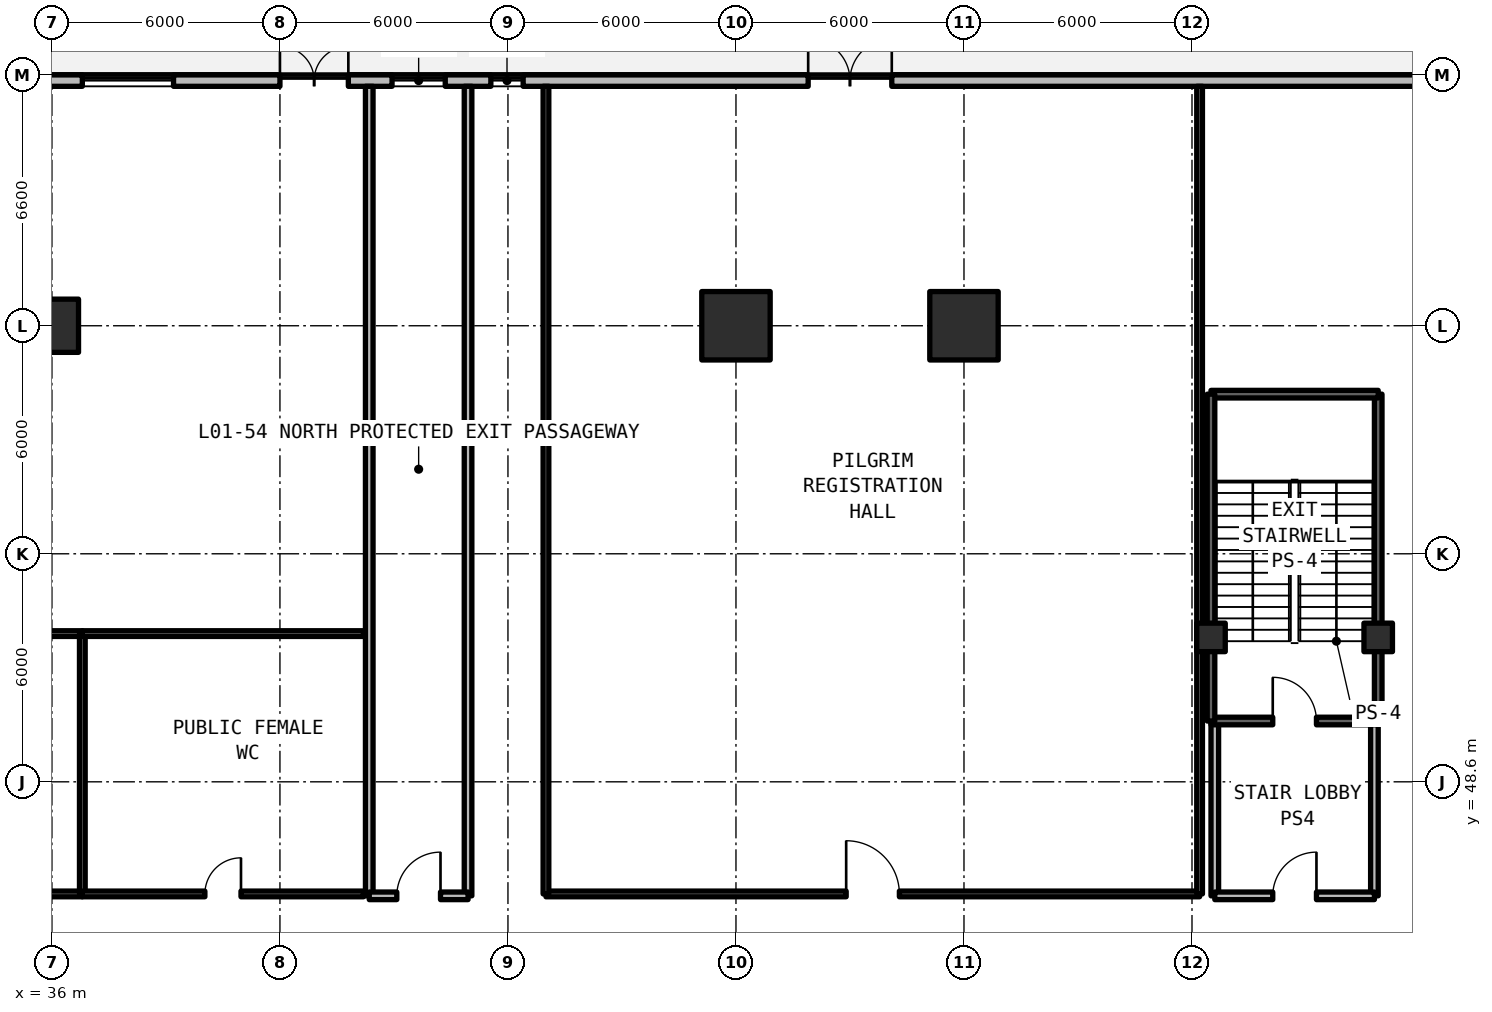
"""IFC4 building model, lengths in metres.
Left out: names, types, materials, properties, quantities, classifications, styles, units other than length and angle.
Written with IfcOpenShell. Run it as: python <this file> out.ifc"""

import sys

from ifc_helpers import new_model, si_unit, direction, frame, frame_2d, origin, origin_2d, place, context, subcontext, project, spatial, rectangle, circle, extrude, element, fill, save


model = new_model("IFC4")
c1 = context("Model", 3, precision=1e-05, world=origin(), true_north=direction((0.0, 1.0)))
c2 = subcontext(c1, "Body", "Model", "MODEL_VIEW")
j1 = project(units=[si_unit("LENGTHUNIT", "METRE"), si_unit("PLANEANGLEUNIT", "RADIAN")], contexts=[c1])
p1 = place(None, origin())
s1 = spatial("IfcSite", under=j1, at=p1, CompositionType="ELEMENT")
p2 = place(p1, origin())
s2 = spatial("IfcBuilding", under=s1, at=p2, CompositionType="ELEMENT")
p3 = place(p2, origin())
s3 = spatial("IfcBuildingStorey", under=s2, at=p3, CompositionType="ELEMENT", Elevation=0.0)
p4 = place(p3, frame((36.0, 60.6, 0.0), z_axis=(0.0, 0.0, 1.0), x_axis=(1.0, 0.0, 0.0)))
e1 = element("IfcColumn", 1, at=p4, inside=s3, PredefinedType="COLUMN", context=c2, shape_type="SweptSolid", body=[
    extrude(circle(Radius=0.7, at=origin_2d()), origin(), (0.0, 0.0, 1.0), 4.95),
])
for number, where, z_axis, x_axis in (
    (2, (54.0, 60.6, 0.0), (0.0, 0.0, 1.0), (1.0, 0.0, 0.0)),
    (3, (60.0, 60.6, 0.0), (0.0, 0.0, 1.0), (1.0, 0.0, 0.0)),
):
    element("IfcColumn", number, at=place(p3, frame(where, z_axis=z_axis, x_axis=x_axis)), inside=s3, PredefinedType="COLUMN", context=c2, shape_type="SweptSolid", body=[
        extrude(rectangle(XDim=1.8, YDim=1.8, at=origin_2d()), origin(), (0.0, 0.0, 1.0), 4.95),
    ])
for number, where, z_axis, x_axis in (
    (4, (66.5, 52.4, 0.0), (0.0, 0.0, 1.0), (1.0, 0.0, 0.0)),
    (5, (70.9, 52.4, 0.0), (0.0, 0.0, 1.0), (1.0, 0.0, 0.0)),
):
    element("IfcColumn", number, at=place(p3, frame(where, z_axis=z_axis, x_axis=x_axis)), inside=s3, PredefinedType="COLUMN", context=c2, shape_type="SweptSolid", body=[
        extrude(rectangle(XDim=0.75, YDim=0.75, at=origin_2d()), origin(), (0.0, 0.0, 1.0), 4.95),
    ])
p5 = place(p3, frame((113.85, 67.05, 0.0), z_axis=(0.0, 0.0, 1.0), x_axis=(-1.0, 0.0, 0.0)))
e6 = element("IfcWall", 6, at=p5, inside=s3, PredefinedType="SOLIDWALL", context=c2, shape_type="SweptSolid", body=[
    extrude(rectangle(XDim=113.7, YDim=0.3, at=frame_2d((56.85, 0.0))), origin(), (0.0, 0.0, 1.0), 4.67),
])
p6 = place(p5, frame((6.25, 0.0, 0.0)))
e7 = element("IfcOpeningElement", 7, at=p6, cuts=e6, PredefinedType="OPENING", context=c2, shape_type="SweptSolid", body=[
    extrude(rectangle(XDim=1.2, YDim=2.2, at=frame_2d((0.6, 1.1))), frame((0.0, 0.16, 0.0), z_axis=(0.0, -1.0, 0.0), x_axis=(1.0, 0.0, 0.0)), (0.0, 0.0, 1.0), 0.32),
])
p7 = place(p5, frame((15.95, 0.0, 0.0)))
e8 = element("IfcOpeningElement", 8, at=p7, cuts=e6, PredefinedType="OPENING", context=c2, shape_type="SweptSolid", body=[
    extrude(rectangle(XDim=1.8, YDim=2.25, at=frame_2d((0.9, 1.125))), frame((0.0, 0.16, 0.0), z_axis=(0.0, -1.0, 0.0), x_axis=(1.0, 0.0, 0.0)), (0.0, 0.0, 1.0), 0.32),
])
p8 = place(p5, frame((55.75, 0.0, 0.0)))
e9 = element("IfcOpeningElement", 9, at=p8, cuts=e6, PredefinedType="OPENING", context=c2, shape_type="SweptSolid", body=[
    extrude(rectangle(XDim=2.2, YDim=2.6, at=frame_2d((1.1, 1.3))), frame((0.0, 0.16, 0.0), z_axis=(0.0, -1.0, 0.0), x_axis=(1.0, 0.0, 0.0)), (0.0, 0.0, 1.0), 0.32),
])
p9 = place(p5, frame((70.05, 0.0, 0.0)))
e10 = element("IfcOpeningElement", 10, at=p9, cuts=e6, PredefinedType="OPENING", context=c2, shape_type="SweptSolid", body=[
    extrude(rectangle(XDim=1.8, YDim=2.25, at=frame_2d((0.9, 1.125))), frame((0.0, 0.16, 0.0), z_axis=(0.0, -1.0, 0.0), x_axis=(1.0, 0.0, 0.0)), (0.0, 0.0, 1.0), 0.32),
])
p10 = place(p5, frame((106.75, 0.0, 0.0)))
e11 = element("IfcOpeningElement", 11, at=p10, cuts=e6, PredefinedType="OPENING", context=c2, shape_type="SweptSolid", body=[
    extrude(rectangle(XDim=1.2, YDim=2.2, at=frame_2d((0.6, 1.1))), frame((0.0, 0.16, 0.0), z_axis=(0.0, -1.0, 0.0), x_axis=(1.0, 0.0, 0.0)), (0.0, 0.0, 1.0), 0.32),
])
p11 = place(p5, frame((67.5, 0.0, 0.78)))
e12 = element("IfcOpeningElement", 12, at=p11, cuts=e6, PredefinedType="OPENING", context=c2, shape_type="SweptSolid", body=[
    extrude(rectangle(XDim=1.4, YDim=1.65, at=frame_2d((0.7, 0.825))), frame((0.0, 0.16, 0.0), z_axis=(0.0, -1.0, 0.0), x_axis=(1.0, 0.0, 0.0)), (0.0, 0.0, 1.0), 0.32),
])
p12 = place(p5, frame((65.45, 0.0, 0.78)))
e13 = element("IfcOpeningElement", 13, at=p12, cuts=e6, PredefinedType="OPENING", context=c2, shape_type="SweptSolid", body=[
    extrude(rectangle(XDim=0.85, YDim=1.65, at=frame_2d((0.425, 0.825))), frame((0.0, 0.16, 0.0), z_axis=(0.0, -1.0, 0.0), x_axis=(1.0, 0.0, 0.0)), (0.0, 0.0, 1.0), 0.32),
])
p13 = place(p5, frame((27.15, 0.0, 0.78)))
e14 = element("IfcOpeningElement", 14, at=p13, cuts=e6, PredefinedType="OPENING", context=c2, shape_type="SweptSolid", body=[
    extrude(rectangle(XDim=2.4, YDim=1.66, at=frame_2d((1.2, 0.83))), frame((0.0, 0.16, 0.0), z_axis=(0.0, -1.0, 0.0), x_axis=(1.0, 0.0, 0.0)), (0.0, 0.0, 1.0), 0.32),
])
p14 = place(p5, frame((36.65, 0.0, 0.78)))
e15 = element("IfcOpeningElement", 15, at=p14, cuts=e6, PredefinedType="OPENING", context=c2, shape_type="SweptSolid", body=[
    extrude(rectangle(XDim=2.4, YDim=1.66, at=frame_2d((1.2, 0.83))), frame((0.0, 0.16, 0.0), z_axis=(0.0, -1.0, 0.0), x_axis=(1.0, 0.0, 0.0)), (0.0, 0.0, 1.0), 0.32),
])
p15 = place(p5, frame((74.65, 0.0, 0.78)))
e16 = element("IfcOpeningElement", 16, at=p15, cuts=e6, PredefinedType="OPENING", context=c2, shape_type="SweptSolid", body=[
    extrude(rectangle(XDim=2.4, YDim=1.66, at=frame_2d((1.2, 0.83))), frame((0.0, 0.16, 0.0), z_axis=(0.0, -1.0, 0.0), x_axis=(1.0, 0.0, 0.0)), (0.0, 0.0, 1.0), 0.32),
])
p16 = place(p5, frame((84.15, 0.0, 0.78)))
e17 = element("IfcOpeningElement", 17, at=p16, cuts=e6, PredefinedType="OPENING", context=c2, shape_type="SweptSolid", body=[
    extrude(rectangle(XDim=2.4, YDim=1.66, at=frame_2d((1.2, 0.83))), frame((0.0, 0.16, 0.0), z_axis=(0.0, -1.0, 0.0), x_axis=(1.0, 0.0, 0.0)), (0.0, 0.0, 1.0), 0.32),
])
p17 = place(p5, frame((93.65, 0.0, 0.78)))
e18 = element("IfcOpeningElement", 18, at=p17, cuts=e6, PredefinedType="OPENING", context=c2, shape_type="SweptSolid", body=[
    extrude(rectangle(XDim=2.4, YDim=1.66, at=frame_2d((1.2, 0.83))), frame((0.0, 0.16, 0.0), z_axis=(0.0, -1.0, 0.0), x_axis=(1.0, 0.0, 0.0)), (0.0, 0.0, 1.0), 0.32),
])
p18 = place(p5, frame((103.15, 0.0, 0.78)))
e19 = element("IfcOpeningElement", 19, at=p18, cuts=e6, PredefinedType="OPENING", context=c2, shape_type="SweptSolid", body=[
    extrude(rectangle(XDim=2.4, YDim=1.66, at=frame_2d((1.2, 0.83))), frame((0.0, 0.16, 0.0), z_axis=(0.0, -1.0, 0.0), x_axis=(1.0, 0.0, 0.0)), (0.0, 0.0, 1.0), 0.32),
])
for number, where, z_axis, x_axis in (
    (20, (66.6, 45.6, 0.0), (0.0, 0.0, 1.0), (0.0, 1.0, 0.0)),
    (21, (70.8, 45.6, 0.0), (0.0, 0.0, 1.0), (0.0, 1.0, 0.0)),
):
    element("IfcWall", number, at=place(p3, frame(where, z_axis=z_axis, x_axis=x_axis)), inside=s3, PredefinedType="SOLIDWALL", context=c2, shape_type="SweptSolid", body=[
        extrude(rectangle(XDim=4.6, YDim=0.2, at=frame_2d((2.3, 0.0))), origin(), (0.0, 0.0, 1.0), 3.89),
    ])
p19 = place(p3, frame((66.6, 45.6, 0.0), z_axis=(0.0, 0.0, 1.0), x_axis=(1.0, 0.0, 0.0)))
e22 = element("IfcWall", 22, at=p19, inside=s3, PredefinedType="SOLIDWALL", context=c2, shape_type="SweptSolid", body=[
    extrude(rectangle(XDim=4.2, YDim=0.2, at=frame_2d((2.1, 0.0))), origin(), (0.0, 0.0, 1.0), 3.89),
])
p20 = place(p19, frame((1.525, 0.0, 0.0)))
e23 = element("IfcOpeningElement", 23, at=p20, cuts=e22, PredefinedType="OPENING", context=c2, shape_type="SweptSolid", body=[
    extrude(rectangle(XDim=1.15, YDim=2.15, at=frame_2d((0.575, 1.075))), frame((0.0, 0.11, 0.0), z_axis=(0.0, -1.0, 0.0), x_axis=(1.0, 0.0, 0.0)), (0.0, 0.0, 1.0), 0.22),
])
for number, where, z_axis, x_axis in (
    (24, (44.35, 45.6, 0.0), (0.0, 0.0, 1.0), (0.0, 1.0, 0.0)),
    (25, (46.95, 45.6, 0.0), (0.0, 0.0, 1.0), (0.0, 1.0, 0.0)),
):
    element("IfcWall", number, at=place(p3, frame(where, z_axis=z_axis, x_axis=x_axis)), inside=s3, PredefinedType="SOLIDWALL", context=c2, shape_type="SweptSolid", body=[
        extrude(rectangle(XDim=21.3, YDim=0.2, at=frame_2d((10.65, 0.0))), origin(), (0.0, 0.0, 1.0), 3.89),
    ])
p21 = place(p3, frame((44.35, 45.6, 0.0), z_axis=(0.0, 0.0, 1.0), x_axis=(1.0, 0.0, 0.0)))
e26 = element("IfcWall", 26, at=p21, inside=s3, PredefinedType="SOLIDWALL", context=c2, shape_type="SweptSolid", body=[
    extrude(rectangle(XDim=2.6, YDim=0.2, at=frame_2d((1.3, 0.0))), origin(), (0.0, 0.0, 1.0), 3.89),
])
p22 = place(p21, frame((0.725, 0.0, 0.0)))
e27 = element("IfcOpeningElement", 27, at=p22, cuts=e26, PredefinedType="OPENING", context=c2, shape_type="SweptSolid", body=[
    extrude(rectangle(XDim=1.15, YDim=2.15, at=frame_2d((0.575, 1.075))), frame((0.0, 0.11, 0.0), z_axis=(0.0, -1.0, 0.0), x_axis=(1.0, 0.0, 0.0)), (0.0, 0.0, 1.0), 0.22),
])
p23 = place(p3, frame((49.0, 45.65, 0.0), z_axis=(0.0, 0.0, 1.0), x_axis=(1.0, 0.0, 0.0)))
e28 = element("IfcWall", 28, at=p23, inside=s3, PredefinedType="SOLIDWALL", context=c2, shape_type="SweptSolid", body=[
    extrude(rectangle(XDim=17.2, YDim=0.15, at=frame_2d((8.6, 0.0))), origin(), (0.0, 0.0, 1.0), 3.89),
])
p24 = place(p23, frame((7.9, 0.0, 0.0)))
e29 = element("IfcOpeningElement", 29, at=p24, cuts=e28, PredefinedType="OPENING", context=c2, shape_type="SweptSolid", body=[
    extrude(rectangle(XDim=1.4, YDim=2.15, at=frame_2d((0.7, 1.075))), frame((0.0, 0.085, 0.0), z_axis=(0.0, -1.0, 0.0), x_axis=(1.0, 0.0, 0.0)), (0.0, 0.0, 1.0), 0.17),
])
for number, where, z_axis, x_axis in (
    (30, (49.0, 45.65, 0.0), (0.0, 0.0, 1.0), (0.0, 1.0, 0.0)),
    (31, (66.2, 45.65, 0.0), (0.0, 0.0, 1.0), (0.0, 1.0, 0.0)),
):
    element("IfcWall", number, at=place(p3, frame(where, z_axis=z_axis, x_axis=x_axis)), inside=s3, PredefinedType="SOLIDWALL", context=c2, shape_type="SweptSolid", body=[
        extrude(rectangle(XDim=21.25, YDim=0.15, at=frame_2d((10.625, 0.0))), origin(), (0.0, 0.0, 1.0), 3.89),
    ])
p25 = place(p3, frame((30.15, 45.65, 0.0), z_axis=(0.0, 0.0, 1.0), x_axis=(1.0, 0.0, 0.0)))
e32 = element("IfcWall", 32, at=p25, inside=s3, PredefinedType="SOLIDWALL", context=c2, shape_type="SweptSolid", body=[
    extrude(rectangle(XDim=6.65, YDim=0.15, at=frame_2d((3.325, 0.0))), origin(), (0.0, 0.0, 1.0), 3.89),
])
p26 = place(p25, frame((2.85, 0.0, 0.0)))
e33 = element("IfcOpeningElement", 33, at=p26, cuts=e32, PredefinedType="OPENING", context=c2, shape_type="SweptSolid", body=[
    extrude(rectangle(XDim=0.95, YDim=2.15, at=frame_2d((0.475, 1.075))), frame((0.0, 0.085, 0.0), z_axis=(0.0, -1.0, 0.0), x_axis=(1.0, 0.0, 0.0)), (0.0, 0.0, 1.0), 0.17),
])
p27 = place(p3, frame((30.15, 52.5, 0.0), z_axis=(0.0, 0.0, 1.0), x_axis=(1.0, 0.0, 0.0)))
e34 = element("IfcWall", 34, at=p27, inside=s3, PredefinedType="SOLIDWALL", context=c2, shape_type="SweptSolid", body=[
    extrude(rectangle(XDim=6.65, YDim=0.15, at=frame_2d((3.325, 0.0))), origin(), (0.0, 0.0, 1.0), 3.89),
])
p28 = place(p3, frame((36.8, 45.65, 0.0), z_axis=(0.0, 0.0, 1.0), x_axis=(0.0, 1.0, 0.0)))
e35 = element("IfcWall", 35, at=p28, inside=s3, PredefinedType="SOLIDWALL", context=c2, shape_type="SweptSolid", body=[
    extrude(rectangle(XDim=6.85, YDim=0.15, at=frame_2d((3.425, 0.0))), origin(), (0.0, 0.0, 1.0), 3.89),
])
p29 = place(p3, frame((36.8, 45.65, 0.0), z_axis=(0.0, 0.0, 1.0), x_axis=(1.0, 0.0, 0.0)))
e36 = element("IfcWall", 36, at=p29, inside=s3, PredefinedType="SOLIDWALL", context=c2, shape_type="SweptSolid", body=[
    extrude(rectangle(XDim=7.4, YDim=0.15, at=frame_2d((3.7, 0.0))), origin(), (0.0, 0.0, 1.0), 3.89),
])
p30 = place(p29, frame((3.225, 0.0, 0.0)))
e37 = element("IfcOpeningElement", 37, at=p30, cuts=e36, PredefinedType="OPENING", context=c2, shape_type="SweptSolid", body=[
    extrude(rectangle(XDim=0.95, YDim=2.15, at=frame_2d((0.475, 1.075))), frame((0.0, 0.085, 0.0), z_axis=(0.0, -1.0, 0.0), x_axis=(1.0, 0.0, 0.0)), (0.0, 0.0, 1.0), 0.17),
])
p31 = place(p3, frame((36.8, 52.5, 0.0), z_axis=(0.0, 0.0, 1.0), x_axis=(1.0, 0.0, 0.0)))
e38 = element("IfcWall", 38, at=p31, inside=s3, PredefinedType="SOLIDWALL", context=c2, shape_type="SweptSolid", body=[
    extrude(rectangle(XDim=7.4, YDim=0.15, at=frame_2d((3.7, 0.0))), origin(), (0.0, 0.0, 1.0), 3.89),
])
p32 = place(p3, frame((66.5, 50.2, 0.0), z_axis=(0.0, 0.0, 1.0), x_axis=(1.0, 0.0, 0.0)))
e39 = element("IfcWall", 39, at=p32, inside=s3, PredefinedType="SOLIDWALL", context=c2, shape_type="SweptSolid", body=[
    extrude(rectangle(XDim=4.4, YDim=0.2, at=frame_2d((2.2, 0.0))), origin(), (0.0, 0.0, 1.0), 4.95),
])
p33 = place(p32, frame((1.625, 0.0, 0.0)))
e40 = element("IfcOpeningElement", 40, at=p33, cuts=e39, PredefinedType="OPENING", context=c2, shape_type="SweptSolid", body=[
    extrude(rectangle(XDim=1.15, YDim=2.15, at=frame_2d((0.575, 1.075))), frame((0.0, 0.11, 0.0), z_axis=(0.0, -1.0, 0.0), x_axis=(1.0, 0.0, 0.0)), (0.0, 0.0, 1.0), 0.22),
])
p34 = place(p3, frame((70.9, 50.2, 0.0), z_axis=(0.0, 0.0, 1.0), x_axis=(0.0, 1.0, 0.0)))
e41 = element("IfcWall", 41, at=p34, inside=s3, PredefinedType="SOLIDWALL", context=c2, shape_type="SweptSolid", body=[
    extrude(rectangle(XDim=8.6, YDim=0.2, at=frame_2d((4.3, 0.0))), origin(), (0.0, 0.0, 1.0), 4.95),
])
p35 = place(p3, frame((70.9, 58.8, 0.0), z_axis=(0.0, 0.0, 1.0), x_axis=(-1.0, 0.0, 0.0)))
e42 = element("IfcWall", 42, at=p35, inside=s3, PredefinedType="SOLIDWALL", context=c2, shape_type="SweptSolid", body=[
    extrude(rectangle(XDim=4.4, YDim=0.2, at=frame_2d((2.2, 0.0))), origin(), (0.0, 0.0, 1.0), 4.95),
])
p36 = place(p3, frame((66.5, 58.8, 0.0), z_axis=(0.0, 0.0, 1.0), x_axis=(0.0, -1.0, 0.0)))
e43 = element("IfcWall", 43, at=p36, inside=s3, PredefinedType="SOLIDWALL", context=c2, shape_type="SweptSolid", body=[
    extrude(rectangle(XDim=8.6, YDim=0.2, at=frame_2d((4.3, 0.0))), origin(), (0.0, 0.0, 1.0), 4.95),
])
p37 = place(p8, frame((2.2, 0.0, 0.0), z_axis=(0.0, 0.0, 1.0), x_axis=(-1.0, 0.0, 0.0)))
e44 = element("IfcDoor", 44, at=p37, inside=s3, OperationType="SINGLE_SWING_LEFT", PredefinedType="DOOR", context=c2, shape_type="SweptSolid", body=[
    extrude(rectangle(XDim=2.2, YDim=2.6, at=frame_2d((1.1, 1.3))), frame((0.0, 0.025, 0.0), z_axis=(0.0, -1.0, 0.0), x_axis=(1.0, 0.0, 0.0)), (0.0, 0.0, 1.0), 0.05),
])
fill(e9, e44)
p38 = place(p9, frame((1.8, 0.0, 0.0), z_axis=(0.0, 0.0, 1.0), x_axis=(-1.0, 0.0, 0.0)))
e45 = element("IfcDoor", 45, at=p38, inside=s3, OperationType="SINGLE_SWING_RIGHT", PredefinedType="DOOR", context=c2, shape_type="SweptSolid", body=[
    extrude(rectangle(XDim=1.8, YDim=2.25, at=frame_2d((0.9, 1.125))), frame((0.0, 0.025, 0.0), z_axis=(0.0, -1.0, 0.0), x_axis=(1.0, 0.0, 0.0)), (0.0, 0.0, 1.0), 0.05),
])
fill(e10, e45)
p39 = place(p11, origin())
e46 = element("IfcWindow", 46, at=p39, inside=s3, PartitioningType="SINGLE_PANEL", PredefinedType="WINDOW", context=c2, shape_type="SweptSolid", body=[
    extrude(rectangle(XDim=1.4, YDim=1.65, at=frame_2d((0.7, 0.825))), frame((0.0, 0.03, 0.0), z_axis=(0.0, -1.0, 0.0), x_axis=(1.0, 0.0, 0.0)), (0.0, 0.0, 1.0), 0.06),
])
fill(e12, e46)
p40 = place(p12, origin())
e47 = element("IfcWindow", 47, at=p40, inside=s3, PartitioningType="SINGLE_PANEL", PredefinedType="WINDOW", context=c2, shape_type="SweptSolid", body=[
    extrude(rectangle(XDim=0.85, YDim=1.65, at=frame_2d((0.425, 0.825))), frame((0.0, 0.03, 0.0), z_axis=(0.0, -1.0, 0.0), x_axis=(1.0, 0.0, 0.0)), (0.0, 0.0, 1.0), 0.06),
])
fill(e13, e47)
p41 = place(p15, origin())
e48 = element("IfcWindow", 48, at=p41, inside=s3, PartitioningType="SINGLE_PANEL", PredefinedType="WINDOW", context=c2, shape_type="SweptSolid", body=[
    extrude(rectangle(XDim=2.4, YDim=1.66, at=frame_2d((1.2, 0.83))), frame((0.0, 0.03, 0.0), z_axis=(0.0, -1.0, 0.0), x_axis=(1.0, 0.0, 0.0)), (0.0, 0.0, 1.0), 0.06),
])
fill(e16, e48)
p42 = place(p20, frame((1.15, 0.0, 0.0), z_axis=(0.0, 0.0, 1.0), x_axis=(-1.0, 0.0, 0.0)))
e49 = element("IfcDoor", 49, at=p42, inside=s3, OperationType="SINGLE_SWING_RIGHT", PredefinedType="DOOR", context=c2, shape_type="SweptSolid", body=[
    extrude(rectangle(XDim=1.15, YDim=2.15, at=frame_2d((0.575, 1.075))), frame((0.0, 0.025, 0.0), z_axis=(0.0, -1.0, 0.0), x_axis=(1.0, 0.0, 0.0)), (0.0, 0.0, 1.0), 0.05),
])
fill(e23, e49)
p43 = place(p22, frame((1.15, 0.0, 0.0), z_axis=(0.0, 0.0, 1.0), x_axis=(-1.0, 0.0, 0.0)))
e50 = element("IfcDoor", 50, at=p43, inside=s3, OperationType="SINGLE_SWING_RIGHT", PredefinedType="DOOR", context=c2, shape_type="SweptSolid", body=[
    extrude(rectangle(XDim=1.15, YDim=2.15, at=frame_2d((0.575, 1.075))), frame((0.0, 0.025, 0.0), z_axis=(0.0, -1.0, 0.0), x_axis=(1.0, 0.0, 0.0)), (0.0, 0.0, 1.0), 0.05),
])
fill(e27, e50)
p44 = place(p24, origin())
e51 = element("IfcDoor", 51, at=p44, inside=s3, OperationType="SINGLE_SWING_RIGHT", PredefinedType="DOOR", context=c2, shape_type="SweptSolid", body=[
    extrude(rectangle(XDim=1.4, YDim=2.15, at=frame_2d((0.7, 1.075))), frame((0.0, 0.025, 0.0), z_axis=(0.0, -1.0, 0.0), x_axis=(1.0, 0.0, 0.0)), (0.0, 0.0, 1.0), 0.05),
])
fill(e29, e51)
p45 = place(p30, frame((0.95, 0.0, 0.0), z_axis=(0.0, 0.0, 1.0), x_axis=(-1.0, 0.0, 0.0)))
e52 = element("IfcDoor", 52, at=p45, inside=s3, OperationType="SINGLE_SWING_RIGHT", PredefinedType="DOOR", context=c2, shape_type="SweptSolid", body=[
    extrude(rectangle(XDim=0.95, YDim=2.15, at=frame_2d((0.475, 1.075))), frame((0.0, 0.025, 0.0), z_axis=(0.0, -1.0, 0.0), x_axis=(1.0, 0.0, 0.0)), (0.0, 0.0, 1.0), 0.05),
])
fill(e37, e52)
p46 = place(p33, frame((1.15, 0.0, 0.0), z_axis=(0.0, 0.0, 1.0), x_axis=(-1.0, 0.0, 0.0)))
e53 = element("IfcDoor", 53, at=p46, inside=s3, OperationType="SINGLE_SWING_RIGHT", PredefinedType="DOOR", context=c2, shape_type="SweptSolid", body=[
    extrude(rectangle(XDim=1.15, YDim=2.15, at=frame_2d((0.575, 1.075))), frame((0.0, 0.025, 0.0), z_axis=(0.0, -1.0, 0.0), x_axis=(1.0, 0.0, 0.0)), (0.0, 0.0, 1.0), 0.05),
])
fill(e40, e53)
save(model, sys.argv[1])
